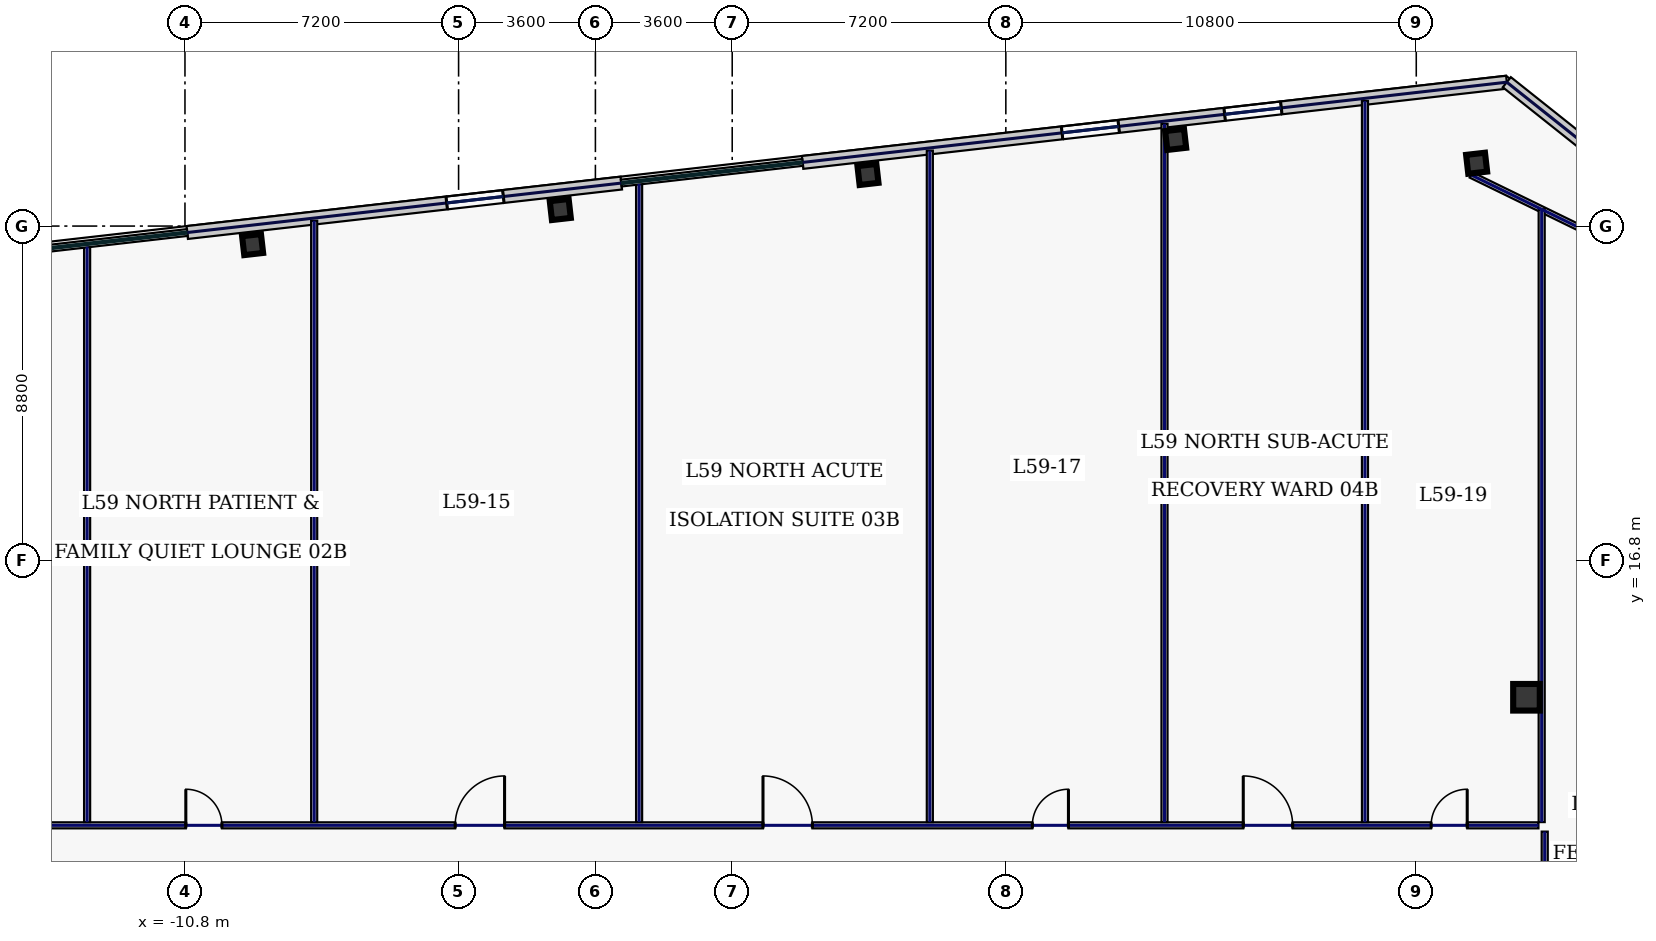
"""IFC4 building model, lengths in metres.
Left out: names, types, materials, properties, quantities, classifications, styles, units other than length and angle.
Written with IfcOpenShell. Run it as: python <this file> out.ifc"""

import sys

from ifc_helpers import new_model, si_unit, direction, frame, frame_2d, origin, origin_2d, place, context, subcontext, project, spatial, rectangle, hollow_rectangle, extrude, element, fill, save


model = new_model("IFC4")
c1 = context("Model", 3, precision=1e-05, world=origin(), true_north=direction((0.0, 1.0)))
c2 = subcontext(c1, "Body", "Model", "MODEL_VIEW")
j1 = project(units=[si_unit("LENGTHUNIT", "METRE"), si_unit("PLANEANGLEUNIT", "RADIAN")], contexts=[c1])
p1 = place(None, origin())
s1 = spatial("IfcSite", under=j1, at=p1, CompositionType="ELEMENT")
p2 = place(p1, origin())
s2 = spatial("IfcBuilding", under=s1, at=p2, CompositionType="ELEMENT")
p3 = place(p2, frame((0.0, 0.0, 255.0)))
s3 = spatial("IfcBuildingStorey", under=s2, at=p3, CompositionType="ELEMENT", Elevation=255.0)
p4 = place(p3, frame((24.5, 13.2, 0.0), z_axis=(0.0, 0.0, 1.0), x_axis=(1.0, 0.0, 0.0)))
e1 = element("IfcColumn", 1, at=p4, inside=s3, PredefinedType="COLUMN", context=c2, shape_type="SweptSolid", body=[
    extrude(hollow_rectangle(XDim=0.7, YDim=0.7, WallThickness=0.032, at=origin_2d()), origin(), (0.0, 0.0, 1.0), 3.74),
])
for number, where, z_axis, x_axis in (
    (2, (23.188, 27.253, 0.0), (0.0, 0.0, 1.0), (0.994, 0.113, 0.0)),
    (3, (15.269, 27.88, 0.0), (0.0, 0.0, 1.0), (0.994, 0.113, 0.0)),
    (4, (7.172, 26.958, 0.0), (0.0, 0.0, 1.0), (0.994, 0.113, 0.0)),
    (5, (-0.924, 26.035, 0.0), (0.0, 0.0, 1.0), (0.994, 0.113, 0.0)),
    (6, (-9.02, 25.113, 0.0), (0.0, 0.0, 1.0), (0.994, 0.113, 0.0)),
):
    element("IfcColumn", number, at=place(p3, frame(where, z_axis=z_axis, x_axis=x_axis)), inside=s3, PredefinedType="COLUMN", context=c2, shape_type="SweptSolid", body=[
        extrude(hollow_rectangle(XDim=0.5, YDim=0.5, WallThickness=0.025, at=origin_2d()), origin(), (0.0, 0.0, 1.0), 3.74),
    ])
p5 = place(p3, frame((23.983, 29.386, 0.0), z_axis=(0.0, 0.0, 1.0), x_axis=(-0.993572271362, -0.113199565282, 0.0)))
e7 = element("IfcWall", 7, at=p5, inside=s3, PredefinedType="STANDARD", context=c2, shape_type="SweptSolid", body=[
    extrude(rectangle(XDim=18.651, YDim=0.34, at=frame_2d((9.326, 0.0))), origin(), (0.0, 0.0, 1.0), 3.74),
])
p6 = place(p5, frame((10.279, 0.0, 0.83)))
e8 = element("IfcOpeningElement", 8, at=p6, cuts=e7, PredefinedType="OPENING", context=c2, shape_type="SweptSolid", body=[
    extrude(rectangle(XDim=1.5, YDim=2.0, at=frame_2d((0.75, 1.0))), frame((0.0, 0.18, 0.0), z_axis=(0.0, -1.0, 0.0), x_axis=(1.0, 0.0, 0.0)), (0.0, 0.0, 1.0), 0.36),
])
p7 = place(p5, frame((5.973, 0.0, 0.83)))
e9 = element("IfcOpeningElement", 9, at=p7, cuts=e7, PredefinedType="OPENING", context=c2, shape_type="SweptSolid", body=[
    extrude(rectangle(XDim=1.5, YDim=2.0, at=frame_2d((0.75, 1.0))), frame((0.0, 0.18, 0.0), z_axis=(0.0, -1.0, 0.0), x_axis=(1.0, 0.0, 0.0)), (0.0, 0.0, 1.0), 0.36),
])
p8 = place(p3, frame((0.682, 26.731, 0.0), z_axis=(0.0, 0.0, 1.0), x_axis=(-0.993571968199, -0.113202226169, 0.0)))
e10 = element("IfcWall", 10, at=p8, inside=s3, PredefinedType="STANDARD", context=c2, shape_type="SweptSolid", body=[
    extrude(rectangle(XDim=11.497, YDim=0.34, at=frame_2d((5.749, 0.0))), origin(), (0.0, 0.0, 1.0), 3.74),
])
p9 = place(p8, frame((3.125, 0.0, 0.83)))
e11 = element("IfcOpeningElement", 11, at=p9, cuts=e10, PredefinedType="OPENING", context=c2, shape_type="SweptSolid", body=[
    extrude(rectangle(XDim=1.5, YDim=2.0, at=frame_2d((0.75, 1.0))), frame((0.0, 0.18, 0.0), z_axis=(0.0, -1.0, 0.0), x_axis=(1.0, 0.0, 0.0)), (0.0, 0.0, 1.0), 0.36),
])
p10 = place(p3, frame((29.107, 25.31, 0.0), z_axis=(0.0, 0.0, 1.0), x_axis=(-0.78259733853, 0.62252823689, 0.0)))
e12 = element("IfcWall", 12, at=p10, inside=s3, PredefinedType="STANDARD", context=c2, shape_type="SweptSolid", body=[
    extrude(rectangle(XDim=6.548, YDim=0.34, at=frame_2d((3.274, 0.0))), origin(), (0.0, 0.0, 1.0), 3.74),
])
p11 = place(p3, frame((28.528, 24.271, 0.0), z_axis=(0.0, 0.0, 1.0), x_axis=(-0.898820692789, 0.438316509173, 0.0)))
e13 = element("IfcWall", 13, at=p11, inside=s3, PredefinedType="PARTITIONING", context=c2, shape_type="SweptSolid", body=[
    extrude(rectangle(XDim=6.107, YDim=0.16, at=frame_2d((3.053, 0.0))), origin(), (0.0, 0.0, 1.0), 3.74),
])
p12 = place(p3, frame((-24.815, 9.83, 0.0), z_axis=(0.0, 0.0, 1.0), x_axis=(1.0, 0.0, 0.0)))
e14 = element("IfcWall", 14, at=p12, inside=s3, PredefinedType="PARTITIONING", context=c2, shape_type="SweptSolid", body=[
    extrude(rectangle(XDim=49.63, YDim=0.16, at=frame_2d((24.815, 0.0))), origin(), (0.0, 0.0, 1.0), 3.74),
])
p13 = place(p12, frame((1.869, 0.0, 0.0)))
e15 = element("IfcOpeningElement", 15, at=p13, cuts=e14, PredefinedType="OPENING", context=c2, shape_type="SweptSolid", body=[
    extrude(rectangle(XDim=1.3, YDim=2.2, at=frame_2d((0.65, 1.1))), frame((0.0, 0.09, 0.0), z_axis=(0.0, -1.0, 0.0), x_axis=(1.0, 0.0, 0.0)), (0.0, 0.0, 1.0), 0.18),
])
p14 = place(p12, frame((7.613, 0.0, 0.0)))
e16 = element("IfcOpeningElement", 16, at=p14, cuts=e14, PredefinedType="OPENING", context=c2, shape_type="SweptSolid", body=[
    extrude(rectangle(XDim=0.95, YDim=2.2, at=frame_2d((0.475, 1.1))), frame((0.0, 0.09, 0.0), z_axis=(0.0, -1.0, 0.0), x_axis=(1.0, 0.0, 0.0)), (0.0, 0.0, 1.0), 0.18),
])
p15 = place(p12, frame((14.038, 0.0, 0.0)))
e17 = element("IfcOpeningElement", 17, at=p15, cuts=e14, PredefinedType="OPENING", context=c2, shape_type="SweptSolid", body=[
    extrude(rectangle(XDim=0.95, YDim=2.2, at=frame_2d((0.475, 1.1))), frame((0.0, 0.09, 0.0), z_axis=(0.0, -1.0, 0.0), x_axis=(1.0, 0.0, 0.0)), (0.0, 0.0, 1.0), 0.18),
])
p16 = place(p12, frame((21.125, 0.0, 0.0)))
e18 = element("IfcOpeningElement", 18, at=p16, cuts=e14, PredefinedType="OPENING", context=c2, shape_type="SweptSolid", body=[
    extrude(rectangle(XDim=1.3, YDim=2.2, at=frame_2d((0.65, 1.1))), frame((0.0, 0.09, 0.0), z_axis=(0.0, -1.0, 0.0), x_axis=(1.0, 0.0, 0.0)), (0.0, 0.0, 1.0), 0.18),
])
p17 = place(p12, frame((29.225, 0.0, 0.0)))
e19 = element("IfcOpeningElement", 19, at=p17, cuts=e14, PredefinedType="OPENING", context=c2, shape_type="SweptSolid", body=[
    extrude(rectangle(XDim=1.3, YDim=2.2, at=frame_2d((0.65, 1.1))), frame((0.0, 0.09, 0.0), z_axis=(0.0, -1.0, 0.0), x_axis=(1.0, 0.0, 0.0)), (0.0, 0.0, 1.0), 0.18),
])
p18 = place(p12, frame((36.312, 0.0, 0.0)))
e20 = element("IfcOpeningElement", 20, at=p18, cuts=e14, PredefinedType="OPENING", context=c2, shape_type="SweptSolid", body=[
    extrude(rectangle(XDim=0.95, YDim=2.2, at=frame_2d((0.475, 1.1))), frame((0.0, 0.09, 0.0), z_axis=(0.0, -1.0, 0.0), x_axis=(1.0, 0.0, 0.0)), (0.0, 0.0, 1.0), 0.18),
])
p19 = place(p12, frame((41.863, 0.0, 0.0)))
e21 = element("IfcOpeningElement", 21, at=p19, cuts=e14, PredefinedType="OPENING", context=c2, shape_type="SweptSolid", body=[
    extrude(rectangle(XDim=1.3, YDim=2.2, at=frame_2d((0.65, 1.1))), frame((0.0, 0.09, 0.0), z_axis=(0.0, -1.0, 0.0), x_axis=(1.0, 0.0, 0.0)), (0.0, 0.0, 1.0), 0.18),
])
p20 = place(p12, frame((46.806, 0.0, 0.0)))
e22 = element("IfcOpeningElement", 22, at=p20, cuts=e14, PredefinedType="OPENING", context=c2, shape_type="SweptSolid", body=[
    extrude(rectangle(XDim=0.95, YDim=2.2, at=frame_2d((0.475, 1.1))), frame((0.0, 0.09, 0.0), z_axis=(0.0, -1.0, 0.0), x_axis=(1.0, 0.0, 0.0)), (0.0, 0.0, 1.0), 0.18),
])
p21 = place(p3, frame((24.98, 9.665, 0.0), z_axis=(0.0, 0.0, 1.0), x_axis=(0.0, -1.0, 0.0)))
e23 = element("IfcWall", 23, at=p21, inside=s3, PredefinedType="PARTITIONING", context=c2, shape_type="SweptSolid", body=[
    extrude(rectangle(XDim=19.28, YDim=0.16, at=frame_2d((9.64, 0.0))), origin(), (0.0, 0.0, 1.0), 3.74),
])
p22 = place(p21, frame((16.531, 0.0, 0.0)))
e24 = element("IfcOpeningElement", 24, at=p22, cuts=e23, PredefinedType="OPENING", context=c2, shape_type="SweptSolid", body=[
    extrude(rectangle(XDim=0.95, YDim=2.2, at=frame_2d((0.475, 1.1))), frame((0.0, 0.09, 0.0), z_axis=(0.0, -1.0, 0.0), x_axis=(1.0, 0.0, 0.0)), (0.0, 0.0, 1.0), 0.18),
])
p23 = place(p21, frame((11.25, 0.0, 0.0)))
e25 = element("IfcOpeningElement", 25, at=p23, cuts=e23, PredefinedType="OPENING", context=c2, shape_type="SweptSolid", body=[
    extrude(rectangle(XDim=0.95, YDim=2.2, at=frame_2d((0.475, 1.1))), frame((0.0, 0.09, 0.0), z_axis=(0.0, -1.0, 0.0), x_axis=(1.0, 0.0, 0.0)), (0.0, 0.0, 1.0), 0.18),
])
p24 = place(p21, frame((6.05, 0.0, 0.0)))
e26 = element("IfcOpeningElement", 26, at=p24, cuts=e23, PredefinedType="OPENING", context=c2, shape_type="SweptSolid", body=[
    extrude(rectangle(XDim=0.95, YDim=2.2, at=frame_2d((0.475, 1.1))), frame((0.0, 0.09, 0.0), z_axis=(0.0, -1.0, 0.0), x_axis=(1.0, 0.0, 0.0)), (0.0, 0.0, 1.0), 0.18),
])
p25 = place(p21, frame((1.994, 0.0, 0.0)))
e27 = element("IfcOpeningElement", 27, at=p25, cuts=e23, PredefinedType="OPENING", context=c2, shape_type="SweptSolid", body=[
    extrude(rectangle(XDim=0.95, YDim=2.2, at=frame_2d((0.475, 1.1))), frame((0.0, 0.09, 0.0), z_axis=(0.0, -1.0, 0.0), x_axis=(1.0, 0.0, 0.0)), (0.0, 0.0, 1.0), 0.18),
])
p26 = place(p3, frame((24.9, 9.915, 0.0), z_axis=(0.0, 0.0, 1.0), x_axis=(0.0, 1.0, 0.0)))
e28 = element("IfcWall", 28, at=p26, inside=s3, PredefinedType="PARTITIONING", context=c2, shape_type="SweptSolid", body=[
    extrude(rectangle(XDim=16.129, YDim=0.16, at=frame_2d((8.065, 0.0))), origin(), (0.0, 0.0, 1.0), 3.74),
])
p27 = place(p3, frame((-7.4, 9.915, 0.0), z_axis=(0.0, 0.0, 1.0), x_axis=(0.0, 1.0, 0.0)))
e29 = element("IfcWall", 29, at=p27, inside=s3, PredefinedType="PARTITIONING", context=c2, shape_type="SweptSolid", body=[
    extrude(rectangle(XDim=15.825, YDim=0.16, at=frame_2d((7.913, 0.0))), origin(), (0.0, 0.0, 1.0), 3.74),
])
p28 = place(p3, frame((8.8, 9.915, 0.0), z_axis=(0.0, 0.0, 1.0), x_axis=(0.0, 1.0, 0.0)))
e30 = element("IfcWall", 30, at=p28, inside=s3, PredefinedType="PARTITIONING", context=c2, shape_type="SweptSolid", body=[
    extrude(rectangle(XDim=17.671, YDim=0.16, at=frame_2d((8.835, 0.0))), origin(), (0.0, 0.0, 1.0), 3.74),
])
p29 = place(p3, frame((20.25, 9.915, 0.0), z_axis=(0.0, 0.0, 1.0), x_axis=(0.0, 1.0, 0.0)))
e31 = element("IfcWall", 31, at=p29, inside=s3, PredefinedType="PARTITIONING", context=c2, shape_type="SweptSolid", body=[
    extrude(rectangle(XDim=18.975, YDim=0.16, at=frame_2d((9.488, 0.0))), origin(), (0.0, 0.0, 1.0), 3.74),
])
p30 = place(p3, frame((-13.375, 9.915, 0.0), z_axis=(0.0, 0.0, 1.0), x_axis=(0.0, 1.0, 0.0)))
e32 = element("IfcWall", 32, at=p30, inside=s3, PredefinedType="PARTITIONING", context=c2, shape_type="SweptSolid", body=[
    extrude(rectangle(XDim=15.144, YDim=0.16, at=frame_2d((7.572, 0.0))), origin(), (0.0, 0.0, 1.0), 3.74),
])
p31 = place(p3, frame((1.15, 9.915, 0.0), z_axis=(0.0, 0.0, 1.0), x_axis=(0.0, 1.0, 0.0)))
e33 = element("IfcWall", 33, at=p31, inside=s3, PredefinedType="PARTITIONING", context=c2, shape_type="SweptSolid", body=[
    extrude(rectangle(XDim=16.799, YDim=0.16, at=frame_2d((8.4, 0.0))), origin(), (0.0, 0.0, 1.0), 3.74),
])
p32 = place(p3, frame((14.975, 9.915, 0.0), z_axis=(0.0, 0.0, 1.0), x_axis=(0.0, 1.0, 0.0)))
e34 = element("IfcWall", 34, at=p32, inside=s3, PredefinedType="PARTITIONING", context=c2, shape_type="SweptSolid", body=[
    extrude(rectangle(XDim=18.375, YDim=0.16, at=frame_2d((9.187, 0.0))), origin(), (0.0, 0.0, 1.0), 3.74),
])
p33 = place(p6, origin())
e35 = element("IfcWindow", 35, at=p33, inside=s3, PartitioningType="SINGLE_PANEL", PredefinedType="WINDOW", context=c2, shape_type="SweptSolid", body=[
    extrude(rectangle(XDim=1.5, YDim=2.0, at=frame_2d((0.75, 1.0))), frame((0.0, 0.03, 0.0), z_axis=(0.0, -1.0, 0.0), x_axis=(1.0, 0.0, 0.0)), (0.0, 0.0, 1.0), 0.06),
])
fill(e8, e35)
p34 = place(p7, origin())
e36 = element("IfcWindow", 36, at=p34, inside=s3, PartitioningType="SINGLE_PANEL", PredefinedType="WINDOW", context=c2, shape_type="SweptSolid", body=[
    extrude(rectangle(XDim=1.5, YDim=2.0, at=frame_2d((0.75, 1.0))), frame((0.0, 0.03, 0.0), z_axis=(0.0, -1.0, 0.0), x_axis=(1.0, 0.0, 0.0)), (0.0, 0.0, 1.0), 0.06),
])
fill(e9, e36)
p35 = place(p9, origin())
e37 = element("IfcWindow", 37, at=p35, inside=s3, PartitioningType="SINGLE_PANEL", PredefinedType="WINDOW", context=c2, shape_type="SweptSolid", body=[
    extrude(rectangle(XDim=1.5, YDim=2.0, at=frame_2d((0.75, 1.0))), frame((0.0, 0.03, 0.0), z_axis=(0.0, -1.0, 0.0), x_axis=(1.0, 0.0, 0.0)), (0.0, 0.0, 1.0), 0.06),
])
fill(e11, e37)
p36 = place(p15, origin())
e38 = element("IfcDoor", 38, at=p36, inside=s3, OperationType="SINGLE_SWING_LEFT", PredefinedType="DOOR", context=c2, shape_type="SweptSolid", body=[
    extrude(rectangle(XDim=0.95, YDim=2.2, at=frame_2d((0.475, 1.1))), frame((0.0, 0.025, 0.0), z_axis=(0.0, -1.0, 0.0), x_axis=(1.0, 0.0, 0.0)), (0.0, 0.0, 1.0), 0.05),
])
fill(e17, e38)
p37 = place(p16, origin())
e39 = element("IfcDoor", 39, at=p37, inside=s3, OperationType="SINGLE_SWING_RIGHT", PredefinedType="DOOR", context=c2, shape_type="SweptSolid", body=[
    extrude(rectangle(XDim=1.3, YDim=2.2, at=frame_2d((0.65, 1.1))), frame((0.0, 0.025, 0.0), z_axis=(0.0, -1.0, 0.0), x_axis=(1.0, 0.0, 0.0)), (0.0, 0.0, 1.0), 0.05),
])
fill(e18, e39)
p38 = place(p17, origin())
e40 = element("IfcDoor", 40, at=p38, inside=s3, OperationType="SINGLE_SWING_LEFT", PredefinedType="DOOR", context=c2, shape_type="SweptSolid", body=[
    extrude(rectangle(XDim=1.3, YDim=2.2, at=frame_2d((0.65, 1.1))), frame((0.0, 0.025, 0.0), z_axis=(0.0, -1.0, 0.0), x_axis=(1.0, 0.0, 0.0)), (0.0, 0.0, 1.0), 0.05),
])
fill(e19, e40)
p39 = place(p18, origin())
e41 = element("IfcDoor", 41, at=p39, inside=s3, OperationType="SINGLE_SWING_RIGHT", PredefinedType="DOOR", context=c2, shape_type="SweptSolid", body=[
    extrude(rectangle(XDim=0.95, YDim=2.2, at=frame_2d((0.475, 1.1))), frame((0.0, 0.025, 0.0), z_axis=(0.0, -1.0, 0.0), x_axis=(1.0, 0.0, 0.0)), (0.0, 0.0, 1.0), 0.05),
])
fill(e20, e41)
p40 = place(p19, origin())
e42 = element("IfcDoor", 42, at=p40, inside=s3, OperationType="SINGLE_SWING_LEFT", PredefinedType="DOOR", context=c2, shape_type="SweptSolid", body=[
    extrude(rectangle(XDim=1.3, YDim=2.2, at=frame_2d((0.65, 1.1))), frame((0.0, 0.025, 0.0), z_axis=(0.0, -1.0, 0.0), x_axis=(1.0, 0.0, 0.0)), (0.0, 0.0, 1.0), 0.05),
])
fill(e21, e42)
p41 = place(p20, origin())
e43 = element("IfcDoor", 43, at=p41, inside=s3, OperationType="SINGLE_SWING_RIGHT", PredefinedType="DOOR", context=c2, shape_type="SweptSolid", body=[
    extrude(rectangle(XDim=0.95, YDim=2.2, at=frame_2d((0.475, 1.1))), frame((0.0, 0.025, 0.0), z_axis=(0.0, -1.0, 0.0), x_axis=(1.0, 0.0, 0.0)), (0.0, 0.0, 1.0), 0.05),
])
fill(e22, e43)
save(model, sys.argv[1])
